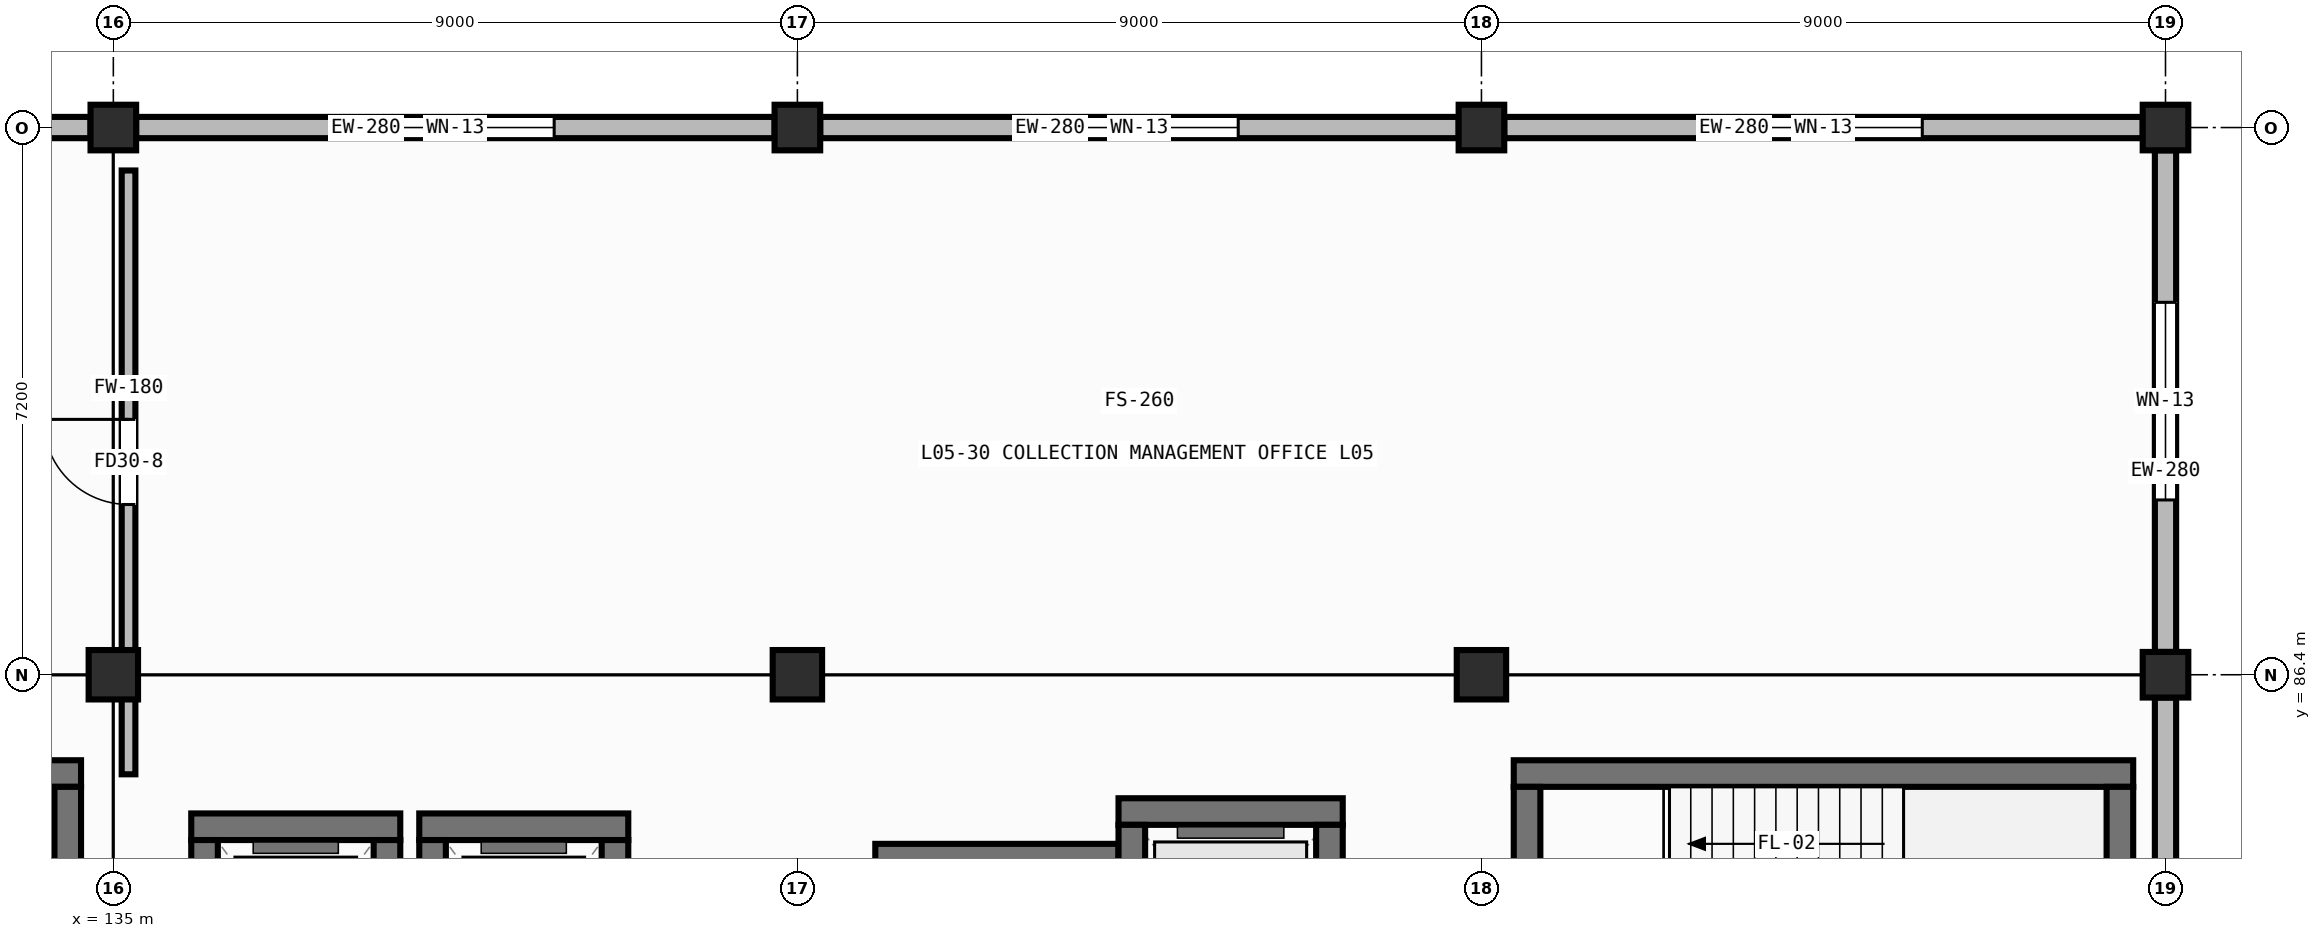
"""IFC4 building model, lengths in metres.
Left out: names, types, materials, properties, quantities, classifications, styles, units other than length and angle.
Written with IfcOpenShell. Run it as: python <this file> out.ifc"""

import sys

from ifc_helpers import new_model, si_unit, direction, frame, frame_2d, origin, origin_2d, place, context, subcontext, project, spatial, rectangle, hollow_rectangle, extrude, element, fill, save


model = new_model("IFC4")
c1 = context("Model", 3, precision=1e-05, world=origin(), true_north=direction((0.0, 1.0)))
c2 = subcontext(c1, "Body", "Model", "MODEL_VIEW")
j1 = project(units=[si_unit("LENGTHUNIT", "METRE"), si_unit("PLANEANGLEUNIT", "RADIAN")], contexts=[c1])
p1 = place(None, origin())
s1 = spatial("IfcSite", under=j1, at=p1, CompositionType="ELEMENT")
p2 = place(p1, origin())
s2 = spatial("IfcBuilding", under=s1, at=p2, CompositionType="ELEMENT")
p3 = place(p2, frame((0.0, 0.0, 17.0)))
s3 = spatial("IfcBuildingStorey", under=s2, at=p3, CompositionType="ELEMENT", Elevation=17.0)
p4 = place(p3, frame((135.0, 86.4, 0.0), z_axis=(0.0, 0.0, 1.0), x_axis=(1.0, 0.0, 0.0)))
e1 = element("IfcColumn", 1, at=p4, inside=s3, PredefinedType="COLUMN", context=c2, shape_type="SweptSolid", body=[
    extrude(hollow_rectangle(XDim=0.65, YDim=0.65, WallThickness=0.025, at=origin_2d()), origin(), (0.0, 0.0, 1.0), 3.6),
])
p5 = place(p3, frame((135.0, 93.6, 0.0), z_axis=(0.0, 0.0, 1.0), x_axis=(1.0, 0.0, 0.0)))
e2 = element("IfcColumn", 2, at=p5, inside=s3, PredefinedType="COLUMN", context=c2, shape_type="SweptSolid", body=[
    extrude(hollow_rectangle(XDim=0.6, YDim=0.6, WallThickness=0.025, at=origin_2d()), origin(), (0.0, 0.0, 1.0), 3.6),
])
p6 = place(p3, frame((144.0, 86.4, 0.0), z_axis=(0.0, 0.0, 1.0), x_axis=(1.0, 0.0, 0.0)))
e3 = element("IfcColumn", 3, at=p6, inside=s3, PredefinedType="COLUMN", context=c2, shape_type="SweptSolid", body=[
    extrude(hollow_rectangle(XDim=0.65, YDim=0.65, WallThickness=0.025, at=origin_2d()), origin(), (0.0, 0.0, 1.0), 3.6),
])
p7 = place(p3, frame((144.0, 93.6, 0.0), z_axis=(0.0, 0.0, 1.0), x_axis=(1.0, 0.0, 0.0)))
e4 = element("IfcColumn", 4, at=p7, inside=s3, PredefinedType="COLUMN", context=c2, shape_type="SweptSolid", body=[
    extrude(hollow_rectangle(XDim=0.6, YDim=0.6, WallThickness=0.025, at=origin_2d()), origin(), (0.0, 0.0, 1.0), 3.6),
])
p8 = place(p3, frame((153.0, 86.4, 0.0), z_axis=(0.0, 0.0, 1.0), x_axis=(1.0, 0.0, 0.0)))
e5 = element("IfcColumn", 5, at=p8, inside=s3, PredefinedType="COLUMN", context=c2, shape_type="SweptSolid", body=[
    extrude(hollow_rectangle(XDim=0.65, YDim=0.65, WallThickness=0.025, at=origin_2d()), origin(), (0.0, 0.0, 1.0), 3.6),
])
for number, where, z_axis, x_axis in (
    (6, (153.0, 93.6, 0.0), (0.0, 0.0, 1.0), (1.0, 0.0, 0.0)),
    (7, (162.0, 86.4, 0.0), (0.0, 0.0, 1.0), (1.0, 0.0, 0.0)),
    (8, (162.0, 93.6, 0.0), (0.0, 0.0, 1.0), (1.0, 0.0, 0.0)),
):
    element("IfcColumn", number, at=place(p3, frame(where, z_axis=z_axis, x_axis=x_axis)), inside=s3, PredefinedType="COLUMN", context=c2, shape_type="SweptSolid", body=[
        extrude(hollow_rectangle(XDim=0.6, YDim=0.6, WallThickness=0.025, at=origin_2d()), origin(), (0.0, 0.0, 1.0), 3.6),
    ])
p9 = place(p3, frame((134.7, 93.6, 0.0), z_axis=(0.0, 0.0, 1.0), x_axis=(-1.0, 0.0, 0.0)))
e9 = element("IfcWall", 9, at=p9, inside=s3, PredefinedType="STANDARD", context=c2, shape_type="SweptSolid", body=[
    extrude(rectangle(XDim=8.4, YDim=0.28, at=frame_2d((4.2, 0.0))), origin(), (0.0, 0.0, 1.0), 2.95),
])
p10 = place(p3, frame((143.7, 93.6, 0.0), z_axis=(0.0, 0.0, 1.0), x_axis=(-1.0, 0.0, 0.0)))
e10 = element("IfcWall", 10, at=p10, inside=s3, PredefinedType="STANDARD", context=c2, shape_type="SweptSolid", body=[
    extrude(rectangle(XDim=8.4, YDim=0.28, at=frame_2d((4.2, 0.0))), origin(), (0.0, 0.0, 1.0), 2.95),
])
p11 = place(p10, frame((2.9, 0.0, 0.85)))
e11 = element("IfcOpeningElement", 11, at=p11, cuts=e10, PredefinedType="OPENING", context=c2, shape_type="SweptSolid", body=[
    extrude(rectangle(XDim=2.6, YDim=1.6, at=frame_2d((1.3, 0.8))), frame((0.0, 0.152, 0.0), z_axis=(0.0, -1.0, 0.0), x_axis=(1.0, 0.0, 0.0)), (0.0, 0.0, 1.0), 0.304),
])
p12 = place(p3, frame((152.7, 93.6, 0.0), z_axis=(0.0, 0.0, 1.0), x_axis=(-1.0, 0.0, 0.0)))
e12 = element("IfcWall", 12, at=p12, inside=s3, PredefinedType="STANDARD", context=c2, shape_type="SweptSolid", body=[
    extrude(rectangle(XDim=8.4, YDim=0.28, at=frame_2d((4.2, 0.0))), origin(), (0.0, 0.0, 1.0), 2.95),
])
p13 = place(p12, frame((2.9, 0.0, 0.85)))
e13 = element("IfcOpeningElement", 13, at=p13, cuts=e12, PredefinedType="OPENING", context=c2, shape_type="SweptSolid", body=[
    extrude(rectangle(XDim=2.6, YDim=1.6, at=frame_2d((1.3, 0.8))), frame((0.0, 0.152, 0.0), z_axis=(0.0, -1.0, 0.0), x_axis=(1.0, 0.0, 0.0)), (0.0, 0.0, 1.0), 0.304),
])
p14 = place(p3, frame((161.7, 93.6, 0.0), z_axis=(0.0, 0.0, 1.0), x_axis=(-1.0, 0.0, 0.0)))
e14 = element("IfcWall", 14, at=p14, inside=s3, PredefinedType="STANDARD", context=c2, shape_type="SweptSolid", body=[
    extrude(rectangle(XDim=8.4, YDim=0.28, at=frame_2d((4.2, 0.0))), origin(), (0.0, 0.0, 1.0), 2.95),
])
p15 = place(p14, frame((2.9, 0.0, 0.85)))
e15 = element("IfcOpeningElement", 15, at=p15, cuts=e14, PredefinedType="OPENING", context=c2, shape_type="SweptSolid", body=[
    extrude(rectangle(XDim=2.6, YDim=1.6, at=frame_2d((1.3, 0.8))), frame((0.0, 0.152, 0.0), z_axis=(0.0, -1.0, 0.0), x_axis=(1.0, 0.0, 0.0)), (0.0, 0.0, 1.0), 0.304),
])
p16 = place(p3, frame((162.0, 86.1, 0.0), z_axis=(0.0, 0.0, 1.0), x_axis=(0.0, -1.0, 0.0)))
e16 = element("IfcWall", 16, at=p16, inside=s3, PredefinedType="STANDARD", context=c2, shape_type="SweptSolid", body=[
    extrude(rectangle(XDim=6.6, YDim=0.28, at=frame_2d((3.3, 0.0))), origin(), (0.0, 0.0, 1.0), 2.94),
])
p17 = place(p3, frame((162.0, 93.3, 0.0), z_axis=(0.0, 0.0, 1.0), x_axis=(0.0, -1.0, 0.0)))
e17 = element("IfcWall", 17, at=p17, inside=s3, PredefinedType="STANDARD", context=c2, shape_type="SweptSolid", body=[
    extrude(rectangle(XDim=6.6, YDim=0.28, at=frame_2d((3.3, 0.0))), origin(), (0.0, 0.0, 1.0), 2.94),
])
p18 = place(p17, frame((2.0, 0.0, 0.85)))
e18 = element("IfcOpeningElement", 18, at=p18, cuts=e17, PredefinedType="OPENING", context=c2, shape_type="SweptSolid", body=[
    extrude(rectangle(XDim=2.6, YDim=1.6, at=frame_2d((1.3, 0.8))), frame((0.0, 0.152, 0.0), z_axis=(0.0, -1.0, 0.0), x_axis=(1.0, 0.0, 0.0)), (0.0, 0.0, 1.0), 0.304),
])
p19 = place(p3, frame((126.425, 85.1, 0.0), z_axis=(0.0, 0.0, 1.0), x_axis=(1.0, 0.0, 0.0)))
e19 = element("IfcWall", 19, at=p19, inside=s3, PredefinedType="SHEAR", context=c2, shape_type="SweptSolid", body=[
    extrude(rectangle(XDim=8.15, YDim=0.35, at=frame_2d((4.075, 0.0))), origin(), (0.0, 0.0, 1.0), 3.34),
])
p20 = place(p3, frame((134.4, 81.375, 0.0), z_axis=(0.0, 0.0, 1.0), x_axis=(0.0, 1.0, 0.0)))
e20 = element("IfcWall", 20, at=p20, inside=s3, PredefinedType="SHEAR", context=c2, shape_type="SweptSolid", body=[
    extrude(rectangle(XDim=3.55, YDim=0.35, at=frame_2d((1.775, 0.0))), origin(), (0.0, 0.0, 1.0), 3.34),
])
p21 = place(p3, frame((153.425, 85.1, 0.0), z_axis=(0.0, 0.0, 1.0), x_axis=(1.0, 0.0, 0.0)))
e21 = element("IfcWall", 21, at=p21, inside=s3, PredefinedType="SHEAR", context=c2, shape_type="SweptSolid", body=[
    extrude(rectangle(XDim=8.15, YDim=0.35, at=frame_2d((4.075, 0.0))), origin(), (0.0, 0.0, 1.0), 3.34),
])
for number, where, z_axis, x_axis in (
    (22, (153.6, 81.375, 0.0), (0.0, 0.0, 1.0), (0.0, 1.0, 0.0)),
    (23, (161.4, 81.375, 0.0), (0.0, 0.0, 1.0), (0.0, 1.0, 0.0)),
):
    element("IfcWall", number, at=place(p3, frame(where, z_axis=z_axis, x_axis=x_axis)), inside=s3, PredefinedType="SHEAR", context=c2, shape_type="SweptSolid", body=[
        extrude(rectangle(XDim=3.55, YDim=0.35, at=frame_2d((1.775, 0.0))), origin(), (0.0, 0.0, 1.0), 3.34),
    ])
p22 = place(p3, frame((136.025, 84.4, 0.0), z_axis=(0.0, 0.0, 1.0), x_axis=(1.0, 0.0, 0.0)))
e24 = element("IfcWall", 24, at=p22, inside=s3, PredefinedType="SHEAR", context=c2, shape_type="SweptSolid", body=[
    extrude(rectangle(XDim=2.75, YDim=0.35, at=frame_2d((1.375, 0.0))), origin(), (0.0, 0.0, 1.0), 3.34),
])
for number, where, z_axis, x_axis in (
    (25, (136.2, 81.375, 0.0), (0.0, 0.0, 1.0), (0.0, 1.0, 0.0)),
    (26, (138.6, 81.375, 0.0), (0.0, 0.0, 1.0), (0.0, 1.0, 0.0)),
):
    element("IfcWall", number, at=place(p3, frame(where, z_axis=z_axis, x_axis=x_axis)), inside=s3, PredefinedType="SHEAR", context=c2, shape_type="SweptSolid", body=[
        extrude(rectangle(XDim=2.85, YDim=0.35, at=frame_2d((1.425, 0.0))), origin(), (0.0, 0.0, 1.0), 3.34),
    ])
p23 = place(p3, frame((139.025, 84.4, 0.0), z_axis=(0.0, 0.0, 1.0), x_axis=(1.0, 0.0, 0.0)))
e27 = element("IfcWall", 27, at=p23, inside=s3, PredefinedType="SHEAR", context=c2, shape_type="SweptSolid", body=[
    extrude(rectangle(XDim=2.75, YDim=0.35, at=frame_2d((1.375, 0.0))), origin(), (0.0, 0.0, 1.0), 3.34),
])
for number, where, z_axis, x_axis in (
    (28, (139.2, 81.375, 0.0), (0.0, 0.0, 1.0), (0.0, 1.0, 0.0)),
    (29, (141.6, 81.375, 0.0), (0.0, 0.0, 1.0), (0.0, 1.0, 0.0)),
):
    element("IfcWall", number, at=place(p3, frame(where, z_axis=z_axis, x_axis=x_axis)), inside=s3, PredefinedType="SHEAR", context=c2, shape_type="SweptSolid", body=[
        extrude(rectangle(XDim=2.85, YDim=0.35, at=frame_2d((1.425, 0.0))), origin(), (0.0, 0.0, 1.0), 3.34),
    ])
p24 = place(p3, frame((145.025, 84.0, 0.0), z_axis=(0.0, 0.0, 1.0), x_axis=(1.0, 0.0, 0.0)))
e30 = element("IfcWall", 30, at=p24, inside=s3, PredefinedType="SHEAR", context=c2, shape_type="SweptSolid", body=[
    extrude(rectangle(XDim=3.2, YDim=0.35, at=frame_2d((1.6, 0.0))), origin(), (0.0, 0.0, 1.0), 3.34),
])
p25 = place(p3, frame((148.225, 84.6, 0.0), z_axis=(0.0, 0.0, 1.0), x_axis=(1.0, 0.0, 0.0)))
e31 = element("IfcWall", 31, at=p25, inside=s3, PredefinedType="SHEAR", context=c2, shape_type="SweptSolid", body=[
    extrude(rectangle(XDim=2.95, YDim=0.35, at=frame_2d((1.475, 0.0))), origin(), (0.0, 0.0, 1.0), 3.34),
])
for number, where, z_axis, x_axis in (
    (32, (148.4, 81.375, 0.0), (0.0, 0.0, 1.0), (0.0, 1.0, 0.0)),
    (33, (151.0, 81.375, 0.0), (0.0, 0.0, 1.0), (0.0, 1.0, 0.0)),
):
    element("IfcWall", number, at=place(p3, frame(where, z_axis=z_axis, x_axis=x_axis)), inside=s3, PredefinedType="SHEAR", context=c2, shape_type="SweptSolid", body=[
        extrude(rectangle(XDim=3.05, YDim=0.35, at=frame_2d((1.525, 0.0))), origin(), (0.0, 0.0, 1.0), 3.34),
    ])
p26 = place(p3, frame((135.2, 85.09, 0.0), z_axis=(0.0, 0.0, 1.0), x_axis=(0.0, 1.0, 0.0)))
e34 = element("IfcWall", 34, at=p26, inside=s3, PredefinedType="PARTITIONING", context=c2, shape_type="SweptSolid", body=[
    extrude(rectangle(XDim=7.945, YDim=0.18, at=frame_2d((3.972, 0.0))), origin(), (0.0, 0.0, 1.0), 2.62),
])
p27 = place(p26, frame((3.55, 0.0, 0.0)))
e35 = element("IfcOpeningElement", 35, at=p27, cuts=e34, PredefinedType="OPENING", context=c2, shape_type="SweptSolid", body=[
    extrude(rectangle(XDim=1.12, YDim=2.08, at=frame_2d((0.56, 1.04))), frame((0.0, 0.102, 0.0), z_axis=(0.0, -1.0, 0.0), x_axis=(1.0, 0.0, 0.0)), (0.0, 0.0, 1.0), 0.204),
])
p28 = place(p11, origin())
e36 = element("IfcWindow", 36, at=p28, inside=s3, PartitioningType="DOUBLE_PANEL_VERTICAL", PredefinedType="WINDOW", context=c2, shape_type="SweptSolid", body=[
    extrude(rectangle(XDim=2.6, YDim=1.6, at=frame_2d((1.3, 0.8))), frame((0.0, 0.03, 0.0), z_axis=(0.0, -1.0, 0.0), x_axis=(1.0, 0.0, 0.0)), (0.0, 0.0, 1.0), 0.06),
])
fill(e11, e36)
p29 = place(p13, origin())
e37 = element("IfcWindow", 37, at=p29, inside=s3, PartitioningType="DOUBLE_PANEL_VERTICAL", PredefinedType="WINDOW", context=c2, shape_type="SweptSolid", body=[
    extrude(rectangle(XDim=2.6, YDim=1.6, at=frame_2d((1.3, 0.8))), frame((0.0, 0.03, 0.0), z_axis=(0.0, -1.0, 0.0), x_axis=(1.0, 0.0, 0.0)), (0.0, 0.0, 1.0), 0.06),
])
fill(e13, e37)
p30 = place(p15, origin())
e38 = element("IfcWindow", 38, at=p30, inside=s3, PartitioningType="DOUBLE_PANEL_VERTICAL", PredefinedType="WINDOW", context=c2, shape_type="SweptSolid", body=[
    extrude(rectangle(XDim=2.6, YDim=1.6, at=frame_2d((1.3, 0.8))), frame((0.0, 0.03, 0.0), z_axis=(0.0, -1.0, 0.0), x_axis=(1.0, 0.0, 0.0)), (0.0, 0.0, 1.0), 0.06),
])
fill(e15, e38)
p31 = place(p18, origin())
e39 = element("IfcWindow", 39, at=p31, inside=s3, PartitioningType="DOUBLE_PANEL_VERTICAL", PredefinedType="WINDOW", context=c2, shape_type="SweptSolid", body=[
    extrude(rectangle(XDim=2.6, YDim=1.6, at=frame_2d((1.3, 0.8))), frame((0.0, 0.03, 0.0), z_axis=(0.0, -1.0, 0.0), x_axis=(1.0, 0.0, 0.0)), (0.0, 0.0, 1.0), 0.06),
])
fill(e18, e39)
p32 = place(p27, origin())
e40 = element("IfcDoor", 40, at=p32, inside=s3, OperationType="SINGLE_SWING_RIGHT", PredefinedType="DOOR", context=c2, shape_type="SweptSolid", body=[
    extrude(rectangle(XDim=1.12, YDim=2.08, at=frame_2d((0.56, 1.04))), frame((0.0, 0.025, 0.0), z_axis=(0.0, -1.0, 0.0), x_axis=(1.0, 0.0, 0.0)), (0.0, 0.0, 1.0), 0.05),
])
fill(e35, e40)
save(model, sys.argv[1])
